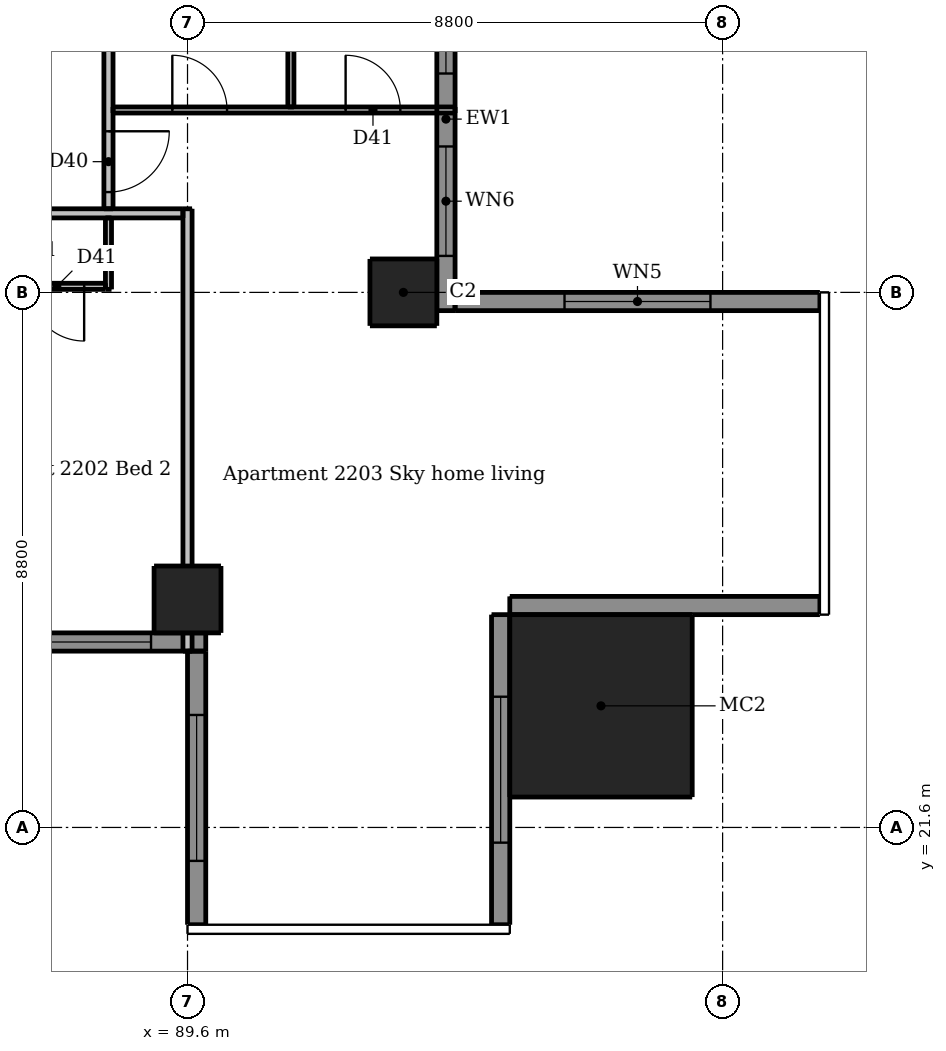
"""IFC4 building model, lengths in metres.
Left out: names, types, materials, properties, quantities, classifications, styles, units other than length and angle.
Written with IfcOpenShell. Run it as: python <this file> out.ifc"""

import sys

from ifc_helpers import new_model, si_unit, direction, frame, frame_2d, origin, origin_2d, place, context, subcontext, project, spatial, rectangle, extrude, element, fill, save


model = new_model("IFC4")
c1 = context("Model", 3, precision=1e-05, world=origin(), true_north=direction((0.0, 1.0)))
c2 = subcontext(c1, "Body", "Model", "MODEL_VIEW")
j1 = project(units=[si_unit("LENGTHUNIT", "METRE"), si_unit("PLANEANGLEUNIT", "RADIAN")], contexts=[c1])
p1 = place(None, origin())
s1 = spatial("IfcSite", under=j1, at=p1, CompositionType="ELEMENT")
p2 = place(p1, origin())
s2 = spatial("IfcBuilding", under=s1, at=p2, CompositionType="ELEMENT")
p3 = place(p2, frame((0.0, 0.0, 85.3)))
s3 = spatial("IfcBuildingStorey", under=s2, at=p3, CompositionType="ELEMENT", Elevation=85.3)
for number, where, z_axis, x_axis in (
    (1, (89.6, 25.35, 0.0), (0.0, 0.0, 1.0), (1.0, 0.0, 0.0)),
    (2, (93.15, 30.4, 0.0), (0.0, 0.0, 1.0), (1.0, 0.0, 0.0)),
):
    element("IfcColumn", number, at=place(p3, frame(where, z_axis=z_axis, x_axis=x_axis)), inside=s3, PredefinedType="COLUMN", context=c2, shape_type="SweptSolid", body=[
        extrude(rectangle(XDim=1.1, YDim=1.1, at=origin_2d()), origin(), (0.0, 0.0, 1.0), 3.05),
    ])
p4 = place(p3, frame((96.4, 23.6, 0.0), z_axis=(0.0, 0.0, 1.0), x_axis=(1.0, 0.0, 0.0)))
e3 = element("IfcColumn", 3, at=p4, inside=s3, PredefinedType="COLUMN", context=c2, shape_type="SweptSolid", body=[
    extrude(rectangle(XDim=3.0, YDim=3.0, at=origin_2d()), origin(), (0.0, 0.0, 1.0), 3.3),
])
p5 = place(p3, frame((89.75, 24.5, 0.0), z_axis=(0.0, 0.0, 1.0), x_axis=(0.0, -1.0, 0.0)))
e4 = element("IfcWall", 4, at=p5, inside=s3, PredefinedType="SOLIDWALL", context=c2, shape_type="SweptSolid", body=[
    extrude(rectangle(XDim=4.5, YDim=0.3, at=frame_2d((2.25, 0.0))), origin(), (0.0, 0.0, 1.0), 3.05),
])
p6 = place(p5, frame((1.05, 0.0, 0.15)))
e5 = element("IfcOpeningElement", 5, at=p6, cuts=e4, PredefinedType="OPENING", context=c2, shape_type="SweptSolid", body=[
    extrude(rectangle(XDim=2.4, YDim=2.1, at=frame_2d((1.2, 1.05))), frame((0.0, 0.16, 0.0), z_axis=(0.0, -1.0, 0.0), x_axis=(1.0, 0.0, 0.0)), (0.0, 0.0, 1.0), 0.32),
])
p7 = place(p3, frame((94.75, 20.0, 0.0), z_axis=(0.0, 0.0, 1.0), x_axis=(0.0, 1.0, 0.0)))
e6 = element("IfcWall", 6, at=p7, inside=s3, PredefinedType="SOLIDWALL", context=c2, shape_type="SweptSolid", body=[
    extrude(rectangle(XDim=5.1, YDim=0.3, at=frame_2d((2.55, 0.0))), origin(), (0.0, 0.0, 1.0), 3.05),
])
p8 = place(p7, frame((1.35, 0.0, 0.15)))
e7 = element("IfcOpeningElement", 7, at=p8, cuts=e6, PredefinedType="OPENING", context=c2, shape_type="SweptSolid", body=[
    extrude(rectangle(XDim=2.4, YDim=2.1, at=frame_2d((1.2, 1.05))), frame((0.0, 0.16, 0.0), z_axis=(0.0, -1.0, 0.0), x_axis=(1.0, 0.0, 0.0)), (0.0, 0.0, 1.0), 0.32),
])
p9 = place(p3, frame((94.9, 25.25, 0.0), z_axis=(0.0, 0.0, 1.0), x_axis=(1.0, 0.0, 0.0)))
e8 = element("IfcWall", 8, at=p9, inside=s3, PredefinedType="SOLIDWALL", context=c2, shape_type="SweptSolid", body=[
    extrude(rectangle(XDim=5.1, YDim=0.3, at=frame_2d((2.55, 0.0))), origin(), (0.0, 0.0, 1.0), 3.05),
])
p10 = place(p3, frame((100.0, 30.25, 0.0), z_axis=(0.0, 0.0, 1.0), x_axis=(-1.0, 0.0, 0.0)))
e9 = element("IfcWall", 9, at=p10, inside=s3, PredefinedType="SOLIDWALL", context=c2, shape_type="SweptSolid", body=[
    extrude(rectangle(XDim=6.0, YDim=0.3, at=frame_2d((3.0, 0.0))), origin(), (0.0, 0.0, 1.0), 3.05),
])
p11 = place(p10, frame((1.8, 0.0, 0.15)))
e10 = element("IfcOpeningElement", 10, at=p11, cuts=e9, PredefinedType="OPENING", context=c2, shape_type="SweptSolid", body=[
    extrude(rectangle(XDim=2.4, YDim=2.1, at=frame_2d((1.2, 1.05))), frame((0.0, 0.16, 0.0), z_axis=(0.0, -1.0, 0.0), x_axis=(1.0, 0.0, 0.0)), (0.0, 0.0, 1.0), 0.32),
])
p12 = place(p3, frame((83.6, 24.65, 0.0), z_axis=(0.0, 0.0, 1.0), x_axis=(1.0, 0.0, 0.0)))
e11 = element("IfcWall", 11, at=p12, inside=s3, PredefinedType="SOLIDWALL", context=c2, shape_type="SweptSolid", body=[
    extrude(rectangle(XDim=6.3, YDim=0.3, at=frame_2d((3.15, 0.0))), origin(), (0.0, 0.0, 1.0), 3.05),
])
p13 = place(p12, frame((0.6, 0.0, 0.15)))
e12 = element("IfcOpeningElement", 12, at=p13, cuts=e11, PredefinedType="OPENING", context=c2, shape_type="SweptSolid", body=[
    extrude(rectangle(XDim=1.8, YDim=2.1, at=frame_2d((0.9, 1.05))), frame((0.0, 0.16, 0.0), z_axis=(0.0, -1.0, 0.0), x_axis=(1.0, 0.0, 0.0)), (0.0, 0.0, 1.0), 0.32),
])
p14 = place(p12, frame((3.6, 0.0, 0.15)))
e13 = element("IfcOpeningElement", 13, at=p14, cuts=e11, PredefinedType="OPENING", context=c2, shape_type="SweptSolid", body=[
    extrude(rectangle(XDim=1.8, YDim=2.1, at=frame_2d((0.9, 1.05))), frame((0.0, 0.16, 0.0), z_axis=(0.0, -1.0, 0.0), x_axis=(1.0, 0.0, 0.0)), (0.0, 0.0, 1.0), 0.32),
])
p15 = place(p3, frame((93.85, 30.1, 0.0), z_axis=(0.0, 0.0, 1.0), x_axis=(0.0, 1.0, 0.0)))
e14 = element("IfcWall", 14, at=p15, inside=s3, PredefinedType="SOLIDWALL", context=c2, shape_type="SweptSolid", body=[
    extrude(rectangle(XDim=6.3, YDim=0.3, at=frame_2d((3.15, 0.0))), origin(), (0.0, 0.0, 1.0), 3.05),
])
p16 = place(p15, frame((0.9, 0.0, 0.15)))
e15 = element("IfcOpeningElement", 15, at=p16, cuts=e14, PredefinedType="OPENING", context=c2, shape_type="SweptSolid", body=[
    extrude(rectangle(XDim=1.8, YDim=2.1, at=frame_2d((0.9, 1.05))), frame((0.0, 0.16, 0.0), z_axis=(0.0, -1.0, 0.0), x_axis=(1.0, 0.0, 0.0)), (0.0, 0.0, 1.0), 0.32),
])
p17 = place(p15, frame((3.9, 0.0, 0.15)))
e16 = element("IfcOpeningElement", 16, at=p17, cuts=e14, PredefinedType="OPENING", context=c2, shape_type="SweptSolid", body=[
    extrude(rectangle(XDim=1.8, YDim=2.1, at=frame_2d((0.9, 1.05))), frame((0.0, 0.16, 0.0), z_axis=(0.0, -1.0, 0.0), x_axis=(1.0, 0.0, 0.0)), (0.0, 0.0, 1.0), 0.32),
])
p18 = place(p3, frame((88.3, 30.45, 0.0), z_axis=(0.0, 0.0, 1.0), x_axis=(0.0, 1.0, 0.0)))
e17 = element("IfcWall", 17, at=p18, inside=s3, PredefinedType="PARTITIONING", context=c2, shape_type="SweptSolid", body=[
    extrude(rectangle(XDim=1.175, YDim=0.1, at=frame_2d((0.587, 0.0))), origin(), (0.0, 0.0, 1.0), 3.05),
])
p19 = place(p3, frame((91.3, 33.45, 0.0), z_axis=(0.0, 0.0, 1.0), x_axis=(0.0, 1.0, 0.0)))
e18 = element("IfcWall", 18, at=p19, inside=s3, PredefinedType="PARTITIONING", context=c2, shape_type="SweptSolid", body=[
    extrude(rectangle(XDim=5.975, YDim=0.1, at=frame_2d((2.988, 0.0))), origin(), (0.0, 0.0, 1.0), 3.05),
])
p20 = place(p19, frame((3.8, 0.0, 0.0)))
e19 = element("IfcOpeningElement", 19, at=p20, cuts=e18, PredefinedType="OPENING", context=c2, shape_type="SweptSolid", body=[
    extrude(rectangle(XDim=0.8, YDim=2.1, at=frame_2d((0.4, 1.05))), frame((0.0, 0.06, 0.0), z_axis=(0.0, -1.0, 0.0), x_axis=(1.0, 0.0, 0.0)), (0.0, 0.0, 1.0), 0.12),
])
p21 = place(p3, frame((88.375, 33.4, 0.0), z_axis=(0.0, 0.0, 1.0), x_axis=(1.0, 0.0, 0.0)))
e20 = element("IfcWall", 20, at=p21, inside=s3, PredefinedType="PARTITIONING", context=c2, shape_type="SweptSolid", body=[
    extrude(rectangle(XDim=5.625, YDim=0.1, at=frame_2d((2.812, 0.0))), origin(), (0.0, 0.0, 1.0), 3.05),
])
p22 = place(p21, frame((0.975, 0.0, 0.0)))
e21 = element("IfcOpeningElement", 21, at=p22, cuts=e20, PredefinedType="OPENING", context=c2, shape_type="SweptSolid", body=[
    extrude(rectangle(XDim=0.9, YDim=2.1, at=frame_2d((0.45, 1.05))), frame((0.0, 0.06, 0.0), z_axis=(0.0, -1.0, 0.0), x_axis=(1.0, 0.0, 0.0)), (0.0, 0.0, 1.0), 0.12),
])
p23 = place(p21, frame((3.825, 0.0, 0.0)))
e22 = element("IfcOpeningElement", 22, at=p23, cuts=e20, PredefinedType="OPENING", context=c2, shape_type="SweptSolid", body=[
    extrude(rectangle(XDim=0.9, YDim=2.1, at=frame_2d((0.45, 1.05))), frame((0.0, 0.06, 0.0), z_axis=(0.0, -1.0, 0.0), x_axis=(1.0, 0.0, 0.0)), (0.0, 0.0, 1.0), 0.12),
])
p24 = place(p3, frame((88.25, 30.5, 0.0), z_axis=(0.0, 0.0, 1.0), x_axis=(-1.0, 0.0, 0.0)))
e23 = element("IfcWall", 23, at=p24, inside=s3, PredefinedType="PARTITIONING", context=c2, shape_type="SweptSolid", body=[
    extrude(rectangle(XDim=13.475, YDim=0.1, at=frame_2d((6.738, 0.0))), origin(), (0.0, 0.0, 1.0), 3.05),
])
p25 = place(p24, frame((6.3, 0.0, 0.0)))
e24 = element("IfcOpeningElement", 24, at=p25, cuts=e23, PredefinedType="OPENING", context=c2, shape_type="SweptSolid", body=[
    extrude(rectangle(XDim=0.9, YDim=2.1, at=frame_2d((0.45, 1.05))), frame((0.0, 0.06, 0.0), z_axis=(0.0, -1.0, 0.0), x_axis=(1.0, 0.0, 0.0)), (0.0, 0.0, 1.0), 0.12),
])
p26 = place(p24, frame((2.4, 0.0, 0.0)))
e25 = element("IfcOpeningElement", 25, at=p26, cuts=e23, PredefinedType="OPENING", context=c2, shape_type="SweptSolid", body=[
    extrude(rectangle(XDim=0.9, YDim=2.1, at=frame_2d((0.45, 1.05))), frame((0.0, 0.06, 0.0), z_axis=(0.0, -1.0, 0.0), x_axis=(1.0, 0.0, 0.0)), (0.0, 0.0, 1.0), 0.12),
])
p27 = place(p24, frame((4.5, 0.0, 0.0)))
e26 = element("IfcOpeningElement", 26, at=p27, cuts=e23, PredefinedType="OPENING", context=c2, shape_type="SweptSolid", body=[
    extrude(rectangle(XDim=0.9, YDim=2.1, at=frame_2d((0.45, 1.05))), frame((0.0, 0.06, 0.0), z_axis=(0.0, -1.0, 0.0), x_axis=(1.0, 0.0, 0.0)), (0.0, 0.0, 1.0), 0.12),
])
p28 = place(p24, frame((11.35, 0.0, 0.0)))
e27 = element("IfcOpeningElement", 27, at=p28, cuts=e23, PredefinedType="OPENING", context=c2, shape_type="SweptSolid", body=[
    extrude(rectangle(XDim=0.9, YDim=2.1, at=frame_2d((0.45, 1.05))), frame((0.0, 0.06, 0.0), z_axis=(0.0, -1.0, 0.0), x_axis=(1.0, 0.0, 0.0)), (0.0, 0.0, 1.0), 0.12),
])
p29 = place(p24, frame((0.35, 0.0, 0.0)))
e28 = element("IfcOpeningElement", 28, at=p29, cuts=e23, PredefinedType="OPENING", context=c2, shape_type="SweptSolid", body=[
    extrude(rectangle(XDim=0.9, YDim=2.1, at=frame_2d((0.45, 1.05))), frame((0.0, 0.06, 0.0), z_axis=(0.0, -1.0, 0.0), x_axis=(1.0, 0.0, 0.0)), (0.0, 0.0, 1.0), 0.12),
])
p30 = place(p24, frame((8.45, 0.0, 0.0)))
e29 = element("IfcOpeningElement", 29, at=p30, cuts=e23, PredefinedType="OPENING", context=c2, shape_type="SweptSolid", body=[
    extrude(rectangle(XDim=0.8, YDim=2.1, at=frame_2d((0.4, 1.05))), frame((0.0, 0.06, 0.0), z_axis=(0.0, -1.0, 0.0), x_axis=(1.0, 0.0, 0.0)), (0.0, 0.0, 1.0), 0.12),
])
p31 = place(p3, frame((88.3, 60.475, 0.0), z_axis=(0.0, 0.0, 1.0), x_axis=(0.0, -1.0, 0.0)))
e30 = element("IfcWall", 30, at=p31, inside=s3, PredefinedType="PARTITIONING", context=c2, shape_type="SweptSolid", body=[
    extrude(rectangle(XDim=28.7, YDim=0.15, at=frame_2d((14.35, 0.0))), origin(), (0.0, 0.0, 1.0), 3.05),
])
p32 = place(p31, frame((27.425, 0.0, 0.0)))
e31 = element("IfcOpeningElement", 31, at=p32, cuts=e30, PredefinedType="OPENING", context=c2, shape_type="SweptSolid", body=[
    extrude(rectangle(XDim=1.0, YDim=2.1, at=frame_2d((0.5, 1.05))), frame((0.0, 0.085, 0.0), z_axis=(0.0, -1.0, 0.0), x_axis=(1.0, 0.0, 0.0)), (0.0, 0.0, 1.0), 0.17),
])
p33 = place(p31, frame((10.575, 0.0, 0.0)))
e32 = element("IfcOpeningElement", 32, at=p33, cuts=e30, PredefinedType="OPENING", context=c2, shape_type="SweptSolid", body=[
    extrude(rectangle(XDim=1.0, YDim=2.1, at=frame_2d((0.5, 1.05))), frame((0.0, 0.085, 0.0), z_axis=(0.0, -1.0, 0.0), x_axis=(1.0, 0.0, 0.0)), (0.0, 0.0, 1.0), 0.17),
])
p34 = place(p3, frame((89.6, 24.5, 0.0), z_axis=(0.0, 0.0, 1.0), x_axis=(0.0, 1.0, 0.0)))
e33 = element("IfcWall", 33, at=p34, inside=s3, PredefinedType="PARTITIONING", context=c2, shape_type="SweptSolid", body=[
    extrude(rectangle(XDim=7.275, YDim=0.15, at=frame_2d((3.637, 0.0))), origin(), (0.0, 0.0, 1.0), 2.516),
])
p35 = place(p3, frame((89.525, 31.7, 0.0), z_axis=(0.0, 0.0, 1.0), x_axis=(-1.0, 0.0, 0.0)))
e34 = element("IfcWall", 34, at=p35, inside=s3, PredefinedType="PARTITIONING", context=c2, shape_type="SweptSolid", body=[
    extrude(rectangle(XDim=28.75, YDim=0.15, at=frame_2d((14.375, 0.0))), origin(), (0.0, 0.0, 1.0), 3.05),
])
p36 = place(p35, frame((24.625, 0.0, 0.0)))
e35 = element("IfcOpeningElement", 35, at=p36, cuts=e34, PredefinedType="OPENING", context=c2, shape_type="SweptSolid", body=[
    extrude(rectangle(XDim=1.0, YDim=2.1, at=frame_2d((0.5, 1.05))), frame((0.0, 0.085, 0.0), z_axis=(0.0, -1.0, 0.0), x_axis=(1.0, 0.0, 0.0)), (0.0, 0.0, 1.0), 0.17),
])
p37 = place(p35, frame((7.525, 0.0, 0.0)))
e36 = element("IfcOpeningElement", 36, at=p37, cuts=e34, PredefinedType="OPENING", context=c2, shape_type="SweptSolid", body=[
    extrude(rectangle(XDim=1.0, YDim=2.1, at=frame_2d((0.5, 1.05))), frame((0.0, 0.085, 0.0), z_axis=(0.0, -1.0, 0.0), x_axis=(1.0, 0.0, 0.0)), (0.0, 0.0, 1.0), 0.17),
])
p38 = place(p6, origin())
e37 = element("IfcWindow", 37, at=p38, inside=s3, PartitioningType="DOUBLE_PANEL_VERTICAL", PredefinedType="WINDOW", context=c2, shape_type="SweptSolid", body=[
    extrude(rectangle(XDim=2.4, YDim=2.1, at=frame_2d((1.2, 1.05))), frame((0.0, 0.03, 0.0), z_axis=(0.0, -1.0, 0.0), x_axis=(1.0, 0.0, 0.0)), (0.0, 0.0, 1.0), 0.06),
])
fill(e5, e37)
p39 = place(p8, origin())
e38 = element("IfcWindow", 38, at=p39, inside=s3, PartitioningType="DOUBLE_PANEL_VERTICAL", PredefinedType="WINDOW", context=c2, shape_type="SweptSolid", body=[
    extrude(rectangle(XDim=2.4, YDim=2.1, at=frame_2d((1.2, 1.05))), frame((0.0, 0.03, 0.0), z_axis=(0.0, -1.0, 0.0), x_axis=(1.0, 0.0, 0.0)), (0.0, 0.0, 1.0), 0.06),
])
fill(e7, e38)
p40 = place(p11, origin())
e39 = element("IfcWindow", 39, at=p40, inside=s3, PartitioningType="DOUBLE_PANEL_VERTICAL", PredefinedType="WINDOW", context=c2, shape_type="SweptSolid", body=[
    extrude(rectangle(XDim=2.4, YDim=2.1, at=frame_2d((1.2, 1.05))), frame((0.0, 0.03, 0.0), z_axis=(0.0, -1.0, 0.0), x_axis=(1.0, 0.0, 0.0)), (0.0, 0.0, 1.0), 0.06),
])
fill(e10, e39)
p41 = place(p14, origin())
e40 = element("IfcWindow", 40, at=p41, inside=s3, PartitioningType="DOUBLE_PANEL_VERTICAL", PredefinedType="WINDOW", context=c2, shape_type="SweptSolid", body=[
    extrude(rectangle(XDim=1.8, YDim=2.1, at=frame_2d((0.9, 1.05))), frame((0.0, 0.03, 0.0), z_axis=(0.0, -1.0, 0.0), x_axis=(1.0, 0.0, 0.0)), (0.0, 0.0, 1.0), 0.06),
])
fill(e13, e40)
p42 = place(p16, origin())
e41 = element("IfcWindow", 41, at=p42, inside=s3, PartitioningType="DOUBLE_PANEL_VERTICAL", PredefinedType="WINDOW", context=c2, shape_type="SweptSolid", body=[
    extrude(rectangle(XDim=1.8, YDim=2.1, at=frame_2d((0.9, 1.05))), frame((0.0, 0.03, 0.0), z_axis=(0.0, -1.0, 0.0), x_axis=(1.0, 0.0, 0.0)), (0.0, 0.0, 1.0), 0.06),
])
fill(e15, e41)
p43 = place(p17, origin())
e42 = element("IfcWindow", 42, at=p43, inside=s3, PartitioningType="DOUBLE_PANEL_VERTICAL", PredefinedType="WINDOW", context=c2, shape_type="SweptSolid", body=[
    extrude(rectangle(XDim=1.8, YDim=2.1, at=frame_2d((0.9, 1.05))), frame((0.0, 0.03, 0.0), z_axis=(0.0, -1.0, 0.0), x_axis=(1.0, 0.0, 0.0)), (0.0, 0.0, 1.0), 0.06),
])
fill(e16, e42)
p44 = place(p29, origin())
e43 = element("IfcDoor", 43, at=p44, inside=s3, OperationType="SINGLE_SWING_LEFT", PredefinedType="DOOR", context=c2, shape_type="SweptSolid", body=[
    extrude(rectangle(XDim=0.9, YDim=2.1, at=frame_2d((0.45, 1.05))), frame((0.0, 0.025, 0.0), z_axis=(0.0, -1.0, 0.0), x_axis=(1.0, 0.0, 0.0)), (0.0, 0.0, 1.0), 0.05),
])
fill(e28, e43)
p45 = place(p32, origin())
e44 = element("IfcDoor", 44, at=p45, inside=s3, OperationType="SINGLE_SWING_LEFT", PredefinedType="DOOR", context=c2, shape_type="SweptSolid", body=[
    extrude(rectangle(XDim=1.0, YDim=2.1, at=frame_2d((0.5, 1.05))), frame((0.0, 0.025, 0.0), z_axis=(0.0, -1.0, 0.0), x_axis=(1.0, 0.0, 0.0)), (0.0, 0.0, 1.0), 0.05),
])
fill(e31, e44)
p46 = place(p22, origin())
e45 = element("IfcDoor", 45, at=p46, inside=s3, OperationType="SINGLE_SWING_LEFT", PredefinedType="DOOR", context=c2, shape_type="SweptSolid", body=[
    extrude(rectangle(XDim=0.9, YDim=2.1, at=frame_2d((0.45, 1.05))), frame((0.0, 0.025, 0.0), z_axis=(0.0, -1.0, 0.0), x_axis=(1.0, 0.0, 0.0)), (0.0, 0.0, 1.0), 0.05),
])
fill(e21, e45)
p47 = place(p23, origin())
e46 = element("IfcDoor", 46, at=p47, inside=s3, OperationType="SINGLE_SWING_LEFT", PredefinedType="DOOR", context=c2, shape_type="SweptSolid", body=[
    extrude(rectangle(XDim=0.9, YDim=2.1, at=frame_2d((0.45, 1.05))), frame((0.0, 0.025, 0.0), z_axis=(0.0, -1.0, 0.0), x_axis=(1.0, 0.0, 0.0)), (0.0, 0.0, 1.0), 0.05),
])
fill(e22, e46)
save(model, sys.argv[1])
